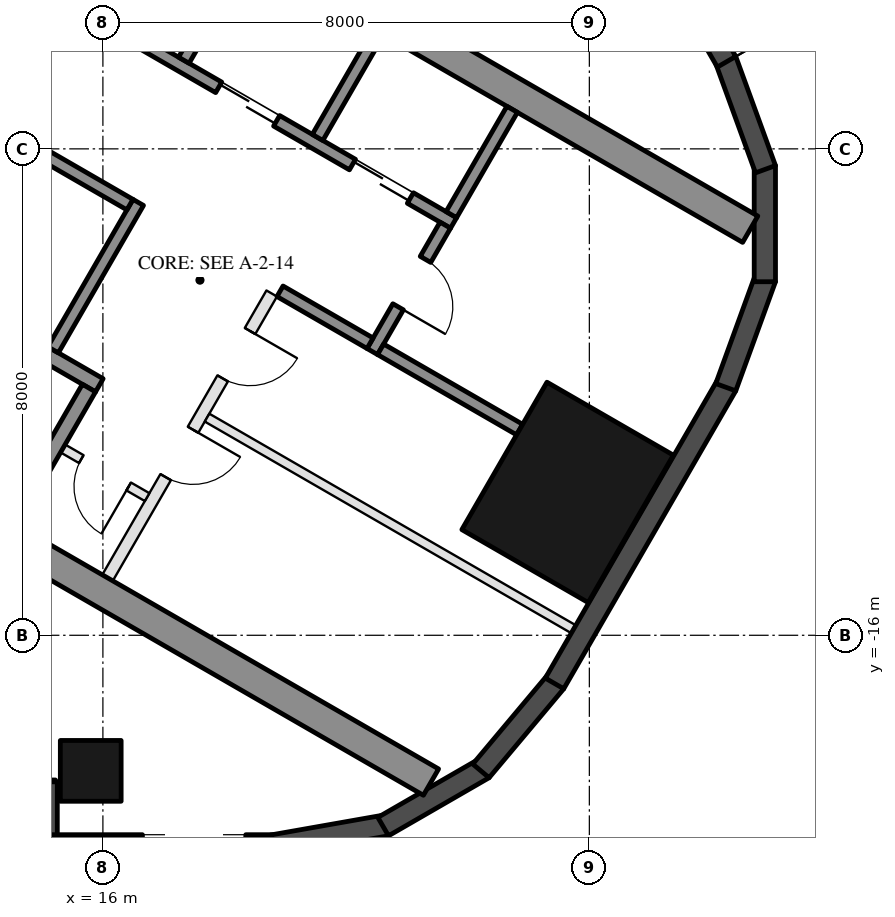
"""IFC4 building model, lengths in metres.
Left out: names, types, materials, properties, quantities, classifications, styles, units other than length and angle.
Written with IfcOpenShell. Run it as: python <this file> out.ifc"""

import sys

from ifc_helpers import new_model, si_unit, direction, frame, frame_2d, origin, origin_2d, place, context, subcontext, project, spatial, rectangle, hollow_rectangle, extrude, element, fill, save


model = new_model("IFC4")
c1 = context("Model", 3, precision=1e-05, world=origin(), true_north=direction((0.0, 1.0)))
c2 = subcontext(c1, "Body", "Model", "MODEL_VIEW")
j1 = project(units=[si_unit("LENGTHUNIT", "METRE"), si_unit("PLANEANGLEUNIT", "RADIAN")], contexts=[c1])
p1 = place(None, origin())
s1 = spatial("IfcSite", under=j1, at=p1, CompositionType="ELEMENT")
p2 = place(p1, origin())
s2 = spatial("IfcBuilding", under=s1, at=p2, CompositionType="ELEMENT")
p3 = place(p2, frame((0.0, 0.0, 72.4)))
s3 = spatial("IfcBuildingStorey", under=s2, at=p3, CompositionType="ELEMENT", Elevation=72.4)
p4 = place(p3, frame((15.8, -18.23, 0.0), z_axis=(0.0, 0.0, 1.0), x_axis=(-1.0, 0.0, 0.0)))
e1 = element("IfcColumn", 1, at=p4, inside=s3, PredefinedType="COLUMN", context=c2, shape_type="SweptSolid", body=[
    extrude(hollow_rectangle(XDim=1.0, YDim=1.0, WallThickness=0.045, at=origin_2d()), origin(), (0.0, 0.0, 1.0), 3.7),
])
p5 = place(p3, frame((23.643, -13.65, 0.0), z_axis=(0.0, 0.0, 1.0), x_axis=(0.5, 0.866025403784, 0.0)))
e2 = element("IfcColumn", 2, at=p5, inside=s3, PredefinedType="COLUMN", context=c2, shape_type="SweptSolid", body=[
    extrude(hollow_rectangle(XDim=2.8, YDim=2.4, WallThickness=0.07, at=origin_2d()), origin(), (0.0, 0.0, 1.0), 3.7),
])
p6 = place(p3, frame((8.48, -18.555, 0.0), z_axis=(0.0, 0.0, 1.0), x_axis=(1.0, 0.0, 0.0)))
e3 = element("IfcWall", 3, at=p6, inside=s3, PredefinedType="SOLIDWALL", context=c2, shape_type="SweptSolid", body=[
    extrude(rectangle(XDim=6.74, YDim=0.35, at=frame_2d((3.37, 0.0))), origin(), (0.0, 0.0, 1.0), 3.55),
])
p7 = place(p6, frame((3.57, 0.0, 0.0)))
e4 = element("IfcOpeningElement", 4, at=p7, cuts=e3, PredefinedType="OPENING", context=c2, shape_type="SweptSolid", body=[
    extrude(rectangle(XDim=2.4, YDim=2.4, at=frame_2d((1.2, 1.2))), frame((0.0, 0.185, 0.0), z_axis=(0.0, -1.0, 0.0), x_axis=(1.0, 0.0, 0.0)), (0.0, 0.0, 1.0), 0.37),
])
p8 = place(p6, frame((0.77, 0.0, 0.3)))
e5 = element("IfcOpeningElement", 5, at=p8, cuts=e3, PredefinedType="OPENING", context=c2, shape_type="SweptSolid", body=[
    extrude(rectangle(XDim=2.5, YDim=2.65, at=frame_2d((1.25, 1.325))), frame((0.0, 0.185, 0.0), z_axis=(0.0, -1.0, 0.0), x_axis=(1.0, 0.0, 0.0)), (0.0, 0.0, 1.0), 0.37),
])
p9 = place(p3, frame((15.075, -18.41, 0.0), z_axis=(0.0, 0.0, 1.0), x_axis=(0.0, -1.0, 0.0)))
e6 = element("IfcWall", 6, at=p9, inside=s3, PredefinedType="SOLIDWALL", context=c2, shape_type="SweptSolid", body=[
    extrude(rectangle(XDim=1.22, YDim=0.35, at=frame_2d((0.61, 0.0))), origin(), (0.0, 0.0, 1.0), 3.55),
])
p10 = place(p3, frame((14.9, -19.455, 0.0), z_axis=(0.0, 0.0, 1.0), x_axis=(1.0, 0.0, 0.0)))
e7 = element("IfcWall", 7, at=p10, inside=s3, PredefinedType="SOLIDWALL", context=c2, shape_type="SweptSolid", body=[
    extrude(rectangle(XDim=3.916, YDim=0.35, at=frame_2d((1.958, 0.0))), origin(), (0.0, 0.0, 1.0), 3.55),
])
p11 = place(p10, frame((1.75, 0.0, 0.3)))
e8 = element("IfcOpeningElement", 8, at=p11, cuts=e7, PredefinedType="OPENING", context=c2, shape_type="SweptSolid", body=[
    extrude(rectangle(XDim=1.7, YDim=2.65, at=frame_2d((0.85, 1.325))), frame((0.0, 0.185, 0.0), z_axis=(0.0, -1.0, 0.0), x_axis=(1.0, 0.0, 0.0)), (0.0, 0.0, 1.0), 0.37),
])
p12 = place(p3, frame((18.785, -19.458, 0.0), z_axis=(0.0, 0.0, 1.0), x_axis=(0.984798995425, 0.173697837091, 0.0)))
e9 = element("IfcWall", 9, at=p12, inside=s3, PredefinedType="SOLIDWALL", context=c2, shape_type="SweptSolid", body=[
    extrude(rectangle(XDim=1.91, YDim=0.35, at=frame_2d((0.955, 0.0))), origin(), (0.0, 0.0, 1.0), 3.55),
])
for number, where, z_axis, x_axis in (
    (10, (20.61, -19.147, 0.0), (0.0, 0.0, 1.0), (0.866, 0.5, 0.0)),
    (11, (22.217, -18.231, 0.0), (0.0, 0.0, 1.0), (0.643, 0.766, 0.0)),
):
    element("IfcWall", number, at=place(p3, frame(where, z_axis=z_axis, x_axis=x_axis)), inside=s3, PredefinedType="SOLIDWALL", context=c2, shape_type="SweptSolid", body=[
        extrude(rectangle(XDim=1.91, YDim=0.35, at=frame_2d((0.955, 0.0))), origin(), (0.0, 0.0, 1.0), 3.55),
    ])
p13 = place(p3, frame((23.427, -16.792, 0.0), z_axis=(0.0, 0.0, 1.0), x_axis=(0.500018773155, 0.866014564827, 0.0)))
e12 = element("IfcWall", 12, at=p13, inside=s3, PredefinedType="SOLIDWALL", context=c2, shape_type="SweptSolid", body=[
    extrude(rectangle(XDim=5.658, YDim=0.35, at=frame_2d((2.829, 0.0))), origin(), (0.0, 0.0, 1.0), 3.55),
])
for number, where, z_axis, x_axis in (
    (13, (26.244, -11.92, 0.0), (0.0, 0.0, 1.0), (0.342, 0.94, 0.0)),
    (14, (26.886, -10.185, 0.0), (0.0, 0.0, 1.0), (0.0, 1.0, 0.0)),
    (15, (26.897, -8.335, 0.0), (0.0, 0.0, 1.0), (-0.342, 0.94, 0.0)),
):
    element("IfcWall", number, at=place(p3, frame(where, z_axis=z_axis, x_axis=x_axis)), inside=s3, PredefinedType="SOLIDWALL", context=c2, shape_type="SweptSolid", body=[
        extrude(rectangle(XDim=1.91, YDim=0.35, at=frame_2d((0.955, 0.0))), origin(), (0.0, 0.0, 1.0), 3.55),
    ])
p14 = place(p3, frame((26.257, -6.567, 0.0), z_axis=(0.0, 0.0, 1.0), x_axis=(-0.500023526245, 0.866011820475, 0.0)))
e16 = element("IfcWall", 16, at=p14, inside=s3, PredefinedType="SOLIDWALL", context=c2, shape_type="SweptSolid", body=[
    extrude(rectangle(XDim=11.816, YDim=0.35, at=frame_2d((5.908, 0.0))), origin(), (0.0, 0.0, 1.0), 3.55),
])
p15 = place(p14, frame((0.38, 0.0, 0.3)))
e17 = element("IfcOpeningElement", 17, at=p15, cuts=e16, PredefinedType="OPENING", context=c2, shape_type="SweptSolid", body=[
    extrude(rectangle(XDim=1.7, YDim=2.65, at=frame_2d((0.85, 1.325))), frame((0.0, 0.185, 0.0), z_axis=(0.0, -1.0, 0.0), x_axis=(1.0, 0.0, 0.0)), (0.0, 0.0, 1.0), 0.37),
])
p16 = place(p14, frame((7.666, 0.0, 0.0)))
e18 = element("IfcOpeningElement", 18, at=p16, cuts=e16, PredefinedType="OPENING", context=c2, shape_type="SweptSolid", body=[
    extrude(rectangle(XDim=2.4, YDim=2.4, at=frame_2d((1.2, 1.2))), frame((0.0, 0.185, 0.0), z_axis=(0.0, -1.0, 0.0), x_axis=(1.0, 0.0, 0.0)), (0.0, 0.0, 1.0), 0.37),
])
p17 = place(p14, frame((3.865, 0.0, 0.3)))
e19 = element("IfcOpeningElement", 19, at=p17, cuts=e16, PredefinedType="OPENING", context=c2, shape_type="SweptSolid", body=[
    extrude(rectangle(XDim=1.6, YDim=2.65, at=frame_2d((0.8, 1.325))), frame((0.0, 0.185, 0.0), z_axis=(0.0, -1.0, 0.0), x_axis=(1.0, 0.0, 0.0)), (0.0, 0.0, 1.0), 0.37),
])
p18 = place(p14, frame((5.765, 0.0, 0.3)))
e20 = element("IfcOpeningElement", 20, at=p18, cuts=e16, PredefinedType="OPENING", context=c2, shape_type="SweptSolid", body=[
    extrude(rectangle(XDim=1.6, YDim=2.65, at=frame_2d((0.8, 1.325))), frame((0.0, 0.185, 0.0), z_axis=(0.0, -1.0, 0.0), x_axis=(1.0, 0.0, 0.0)), (0.0, 0.0, 1.0), 0.37),
])
for number, where, z_axis, x_axis in (
    (21, (8.547, -10.997, 0.0), (0.0, 0.0, 1.0), (0.866, -0.5, 0.0)),
    (22, (13.797, -1.903, 0.0), (0.0, 0.0, 1.0), (0.866, -0.5, 0.0)),
):
    element("IfcWall", number, at=place(p3, frame(where, z_axis=z_axis, x_axis=x_axis)), inside=s3, PredefinedType="SHEAR", context=c2, shape_type="SweptSolid", body=[
        extrude(rectangle(XDim=14.837, YDim=0.5, at=frame_2d((7.418, 0.0))), origin(), (0.0, 0.0, 1.0), 3.5),
    ])
p19 = place(p3, frame((10.356, -8.664, 0.0), z_axis=(0.0, 0.0, 1.0), x_axis=(0.866028629588, -0.499994412703, 0.0)))
e23 = element("IfcWall", 23, at=p19, inside=s3, PredefinedType="SHEAR", context=c2, shape_type="SweptSolid", body=[
    extrude(rectangle(XDim=6.45, YDim=0.25, at=frame_2d((3.225, 0.0))), origin(), (0.0, 0.0, 1.0), 3.5),
])
p20 = place(p19, frame((0.3, 0.0, 0.0)))
e24 = element("IfcOpeningElement", 24, at=p20, cuts=e23, PredefinedType="OPENING", context=c2, shape_type="SweptSolid", body=[
    extrude(rectangle(XDim=1.0, YDim=2.1, at=frame_2d((0.5, 1.05))), frame((0.0, 0.135, 0.0), z_axis=(0.0, -1.0, 0.0), x_axis=(1.0, 0.0, 0.0)), (0.0, 0.0, 1.0), 0.27),
])
p21 = place(p3, frame((14.496, -14.143, 0.0), z_axis=(0.0, 0.0, 1.0), x_axis=(0.500062241894, 0.865989465428, 0.0)))
e25 = element("IfcWall", 25, at=p21, inside=s3, PredefinedType="SHEAR", context=c2, shape_type="SweptSolid", body=[
    extrude(rectangle(XDim=2.55, YDim=0.25, at=frame_2d((1.275, 0.0))), origin(), (0.0, 0.0, 1.0), 3.5),
])
p22 = place(p3, frame((15.181, -11.305, 0.0), z_axis=(0.0, 0.0, 1.0), x_axis=(0.49994636267, 0.866056369097, 0.0)))
e26 = element("IfcWall", 26, at=p22, inside=s3, PredefinedType="SHEAR", context=c2, shape_type="SweptSolid", body=[
    extrude(rectangle(XDim=2.8, YDim=0.2, at=frame_2d((1.4, 0.0))), origin(), (0.0, 0.0, 1.0), 3.5),
])
p23 = place(p3, frame((14.02, -7.517, 0.0), z_axis=(0.0, 0.0, 1.0), x_axis=(0.866034573852, -0.49998411664, 0.0)))
e27 = element("IfcWall", 27, at=p23, inside=s3, PredefinedType="SHEAR", context=c2, shape_type="SweptSolid", body=[
    extrude(rectangle(XDim=2.8, YDim=0.2, at=frame_2d((1.4, 0.0))), origin(), (0.0, 0.0, 1.0), 3.5),
])
p24 = place(p3, frame((12.968, -4.138, 0.0), z_axis=(0.0, 0.0, 1.0), x_axis=(0.866028328073, -0.49999493495, 0.0)))
e28 = element("IfcWall", 28, at=p24, inside=s3, PredefinedType="SHEAR", context=c2, shape_type="SweptSolid", body=[
    extrude(rectangle(XDim=10.16, YDim=0.2, at=frame_2d((5.08, 0.0))), origin(), (0.0, 0.0, 1.0), 3.5),
])
p25 = place(p24, frame((0.62, 0.0, 0.0)))
e29 = element("IfcOpeningElement", 29, at=p25, cuts=e28, PredefinedType="OPENING", context=c2, shape_type="SweptSolid", body=[
    extrude(rectangle(XDim=1.1, YDim=2.1, at=frame_2d((0.55, 1.05))), frame((0.0, 0.11, 0.0), z_axis=(0.0, -1.0, 0.0), x_axis=(1.0, 0.0, 0.0)), (0.0, 0.0, 1.0), 0.22),
])
p26 = place(p24, frame((3.16, 0.0, 0.0)))
e30 = element("IfcOpeningElement", 30, at=p26, cuts=e28, PredefinedType="OPENING", context=c2, shape_type="SweptSolid", body=[
    extrude(rectangle(XDim=1.1, YDim=2.1, at=frame_2d((0.55, 1.05))), frame((0.0, 0.11, 0.0), z_axis=(0.0, -1.0, 0.0), x_axis=(1.0, 0.0, 0.0)), (0.0, 0.0, 1.0), 0.22),
])
p27 = place(p24, frame((5.7, 0.0, 0.0)))
e31 = element("IfcOpeningElement", 31, at=p27, cuts=e28, PredefinedType="OPENING", context=c2, shape_type="SweptSolid", body=[
    extrude(rectangle(XDim=1.1, YDim=2.1, at=frame_2d((0.55, 1.05))), frame((0.0, 0.11, 0.0), z_axis=(0.0, -1.0, 0.0), x_axis=(1.0, 0.0, 0.0)), (0.0, 0.0, 1.0), 0.22),
])
p28 = place(p24, frame((8.24, 0.0, 0.0)))
e32 = element("IfcOpeningElement", 32, at=p28, cuts=e28, PredefinedType="OPENING", context=c2, shape_type="SweptSolid", body=[
    extrude(rectangle(XDim=1.1, YDim=2.1, at=frame_2d((0.55, 1.05))), frame((0.0, 0.11, 0.0), z_axis=(0.0, -1.0, 0.0), x_axis=(1.0, 0.0, 0.0)), (0.0, 0.0, 1.0), 0.22),
])
p29 = place(p3, frame((20.43, -11.333, 0.0), z_axis=(0.0, 0.0, 1.0), x_axis=(0.500001309137, 0.866024647952, 0.0)))
e33 = element("IfcWall", 33, at=p29, inside=s3, PredefinedType="SHEAR", context=c2, shape_type="SweptSolid", body=[
    extrude(rectangle(XDim=2.4, YDim=0.2, at=frame_2d((1.2, 0.0))), origin(), (0.0, 0.0, 1.0), 3.5),
])
p30 = place(p29, frame((0.85, 0.0, 0.0)))
e34 = element("IfcOpeningElement", 34, at=p30, cuts=e33, PredefinedType="OPENING", context=c2, shape_type="SweptSolid", body=[
    extrude(rectangle(XDim=0.9, YDim=2.1, at=frame_2d((0.45, 1.05))), frame((0.0, 0.11, 0.0), z_axis=(0.0, -1.0, 0.0), x_axis=(1.0, 0.0, 0.0)), (0.0, 0.0, 1.0), 0.22),
])
p31 = place(p3, frame((18.913, -10.342, 0.0), z_axis=(0.0, 0.0, 1.0), x_axis=(0.866038183914, -0.499977863513, 0.0)))
e35 = element("IfcWall", 35, at=p31, inside=s3, PredefinedType="SHEAR", context=c2, shape_type="SweptSolid", body=[
    extrude(rectangle(XDim=1.71, YDim=0.2, at=frame_2d((0.855, 0.0))), origin(), (0.0, 0.0, 1.0), 3.5),
])
for number, where, z_axis, x_axis in (
    (36, (17.331, -6.542, 0.0), (0.0, 0.0, 1.0), (0.5, 0.866, 0.0)),
    (37, (19.531, -7.812, 0.0), (0.0, 0.0, 1.0), (0.5, 0.866, 0.0)),
    (38, (21.73, -9.082, 0.0), (0.0, 0.0, 1.0), (0.5, 0.866, 0.0)),
):
    element("IfcWall", number, at=place(p3, frame(where, z_axis=z_axis, x_axis=x_axis)), inside=s3, PredefinedType="SHEAR", context=c2, shape_type="SweptSolid", body=[
        extrude(rectangle(XDim=2.0, YDim=0.2, at=frame_2d((1.0, 0.0))), origin(), (0.0, 0.0, 1.0), 3.5),
    ])
p32 = place(p3, frame((20.567, -11.297, 0.0), z_axis=(0.0, 0.0, 1.0), x_axis=(0.866060851709, -0.499938597367, 0.0)))
e39 = element("IfcWall", 39, at=p32, inside=s3, PredefinedType="SHEAR", context=c2, shape_type="SweptSolid", body=[
    extrude(rectangle(XDim=2.64, YDim=0.2, at=frame_2d((1.32, 0.0))), origin(), (0.0, 0.0, 1.0), 3.5),
])
p33 = place(p3, frame((16.076, -15.055, 0.0), z_axis=(0.0, 0.0, 1.0), x_axis=(0.499995103361, 0.866028230842, 0.0)))
e40 = element("IfcWall", 40, at=p33, inside=s3, PredefinedType="PARTITIONING", context=c2, shape_type="SweptSolid", body=[
    extrude(rectangle(XDim=5.4, YDim=0.2, at=frame_2d((2.7, 0.0))), origin(), (0.0, 0.0, 1.0), 3.5),
])
p34 = place(p33, frame((1.913, 0.0, 0.0)))
e41 = element("IfcOpeningElement", 41, at=p34, cuts=e40, PredefinedType="OPENING", context=c2, shape_type="SweptSolid", body=[
    extrude(rectangle(XDim=0.9, YDim=2.1, at=frame_2d((0.45, 1.05))), frame((0.0, 0.11, 0.0), z_axis=(0.0, -1.0, 0.0), x_axis=(1.0, 0.0, 0.0)), (0.0, 0.0, 1.0), 0.22),
])
p35 = place(p33, frame((3.788, 0.0, 0.0)))
e42 = element("IfcOpeningElement", 42, at=p35, cuts=e40, PredefinedType="OPENING", context=c2, shape_type="SweptSolid", body=[
    extrude(rectangle(XDim=0.9, YDim=2.1, at=frame_2d((0.45, 1.05))), frame((0.0, 0.11, 0.0), z_axis=(0.0, -1.0, 0.0), x_axis=(1.0, 0.0, 0.0)), (0.0, 0.0, 1.0), 0.22),
])
p36 = place(p3, frame((15.342, -12.928, 0.0), z_axis=(0.0, 0.0, 1.0), x_axis=(0.865989903783, -0.500061482766, 0.0)))
e43 = element("IfcWall", 43, at=p36, inside=s3, PredefinedType="PARTITIONING", context=c2, shape_type="SweptSolid", body=[
    extrude(rectangle(XDim=1.6, YDim=0.15, at=frame_2d((0.8, 0.0))), origin(), (0.0, 0.0, 1.0), 3.5),
])
p37 = place(p36, frame((0.35, 0.0, 0.0)))
e44 = element("IfcOpeningElement", 44, at=p37, cuts=e43, PredefinedType="OPENING", context=c2, shape_type="SweptSolid", body=[
    extrude(rectangle(XDim=0.9, YDim=2.1, at=frame_2d((0.45, 1.05))), frame((0.0, 0.085, 0.0), z_axis=(0.0, -1.0, 0.0), x_axis=(1.0, 0.0, 0.0)), (0.0, 0.0, 1.0), 0.17),
])
p38 = place(p3, frame((17.713, -12.42, 0.0), z_axis=(0.0, 0.0, 1.0), x_axis=(0.866016523273, -0.500015381182, 0.0)))
e45 = element("IfcWall", 45, at=p38, inside=s3, PredefinedType="PARTITIONING", context=c2, shape_type="SweptSolid", body=[
    extrude(rectangle(XDim=6.95, YDim=0.15, at=frame_2d((3.475, 0.0))), origin(), (0.0, 0.0, 1.0), 3.5),
])
p39 = place(p37, frame((0.9, 0.0, 0.0), z_axis=(0.0, 0.0, 1.0), x_axis=(-1.0, 0.0, 0.0)))
e46 = element("IfcDoor", 46, at=p39, inside=s3, OperationType="SINGLE_SWING_LEFT", PredefinedType="DOOR", context=c2, shape_type="SweptSolid", body=[
    extrude(rectangle(XDim=0.9, YDim=2.1, at=frame_2d((0.45, 1.05))), frame((0.0, 0.025, 0.0), z_axis=(0.0, -1.0, 0.0), x_axis=(1.0, 0.0, 0.0)), (0.0, 0.0, 1.0), 0.05),
])
fill(e44, e46)
p40 = place(p27, origin())
e47 = element("IfcDoor", 47, at=p40, inside=s3, OperationType="DOUBLE_DOOR_SLIDING", PredefinedType="DOOR", context=c2, shape_type="SweptSolid", body=[
    extrude(rectangle(XDim=1.1, YDim=2.1, at=frame_2d((0.55, 1.05))), frame((0.0, 0.025, 0.0), z_axis=(0.0, -1.0, 0.0), x_axis=(1.0, 0.0, 0.0)), (0.0, 0.0, 1.0), 0.05),
])
fill(e31, e47)
p41 = place(p28, origin())
e48 = element("IfcDoor", 48, at=p41, inside=s3, OperationType="DOUBLE_DOOR_SLIDING", PredefinedType="DOOR", context=c2, shape_type="SweptSolid", body=[
    extrude(rectangle(XDim=1.1, YDim=2.1, at=frame_2d((0.55, 1.05))), frame((0.0, 0.025, 0.0), z_axis=(0.0, -1.0, 0.0), x_axis=(1.0, 0.0, 0.0)), (0.0, 0.0, 1.0), 0.05),
])
fill(e32, e48)
p42 = place(p30, frame((0.9, 0.0, 0.0), z_axis=(0.0, 0.0, 1.0), x_axis=(-1.0, 0.0, 0.0)))
e49 = element("IfcDoor", 49, at=p42, inside=s3, OperationType="SINGLE_SWING_RIGHT", PredefinedType="DOOR", context=c2, shape_type="SweptSolid", body=[
    extrude(rectangle(XDim=0.9, YDim=2.1, at=frame_2d((0.45, 1.05))), frame((0.0, 0.025, 0.0), z_axis=(0.0, -1.0, 0.0), x_axis=(1.0, 0.0, 0.0)), (0.0, 0.0, 1.0), 0.05),
])
fill(e34, e49)
p43 = place(p34, frame((0.9, 0.0, 0.0), z_axis=(0.0, 0.0, 1.0), x_axis=(-1.0, 0.0, 0.0)))
e50 = element("IfcDoor", 50, at=p43, inside=s3, OperationType="SINGLE_SWING_LEFT", PredefinedType="DOOR", context=c2, shape_type="SweptSolid", body=[
    extrude(rectangle(XDim=0.9, YDim=2.1, at=frame_2d((0.45, 1.05))), frame((0.0, 0.025, 0.0), z_axis=(0.0, -1.0, 0.0), x_axis=(1.0, 0.0, 0.0)), (0.0, 0.0, 1.0), 0.05),
])
fill(e41, e50)
p44 = place(p35, frame((0.9, 0.0, 0.0), z_axis=(0.0, 0.0, 1.0), x_axis=(-1.0, 0.0, 0.0)))
e51 = element("IfcDoor", 51, at=p44, inside=s3, OperationType="SINGLE_SWING_LEFT", PredefinedType="DOOR", context=c2, shape_type="SweptSolid", body=[
    extrude(rectangle(XDim=0.9, YDim=2.1, at=frame_2d((0.45, 1.05))), frame((0.0, 0.025, 0.0), z_axis=(0.0, -1.0, 0.0), x_axis=(1.0, 0.0, 0.0)), (0.0, 0.0, 1.0), 0.05),
])
fill(e42, e51)
save(model, sys.argv[1])
